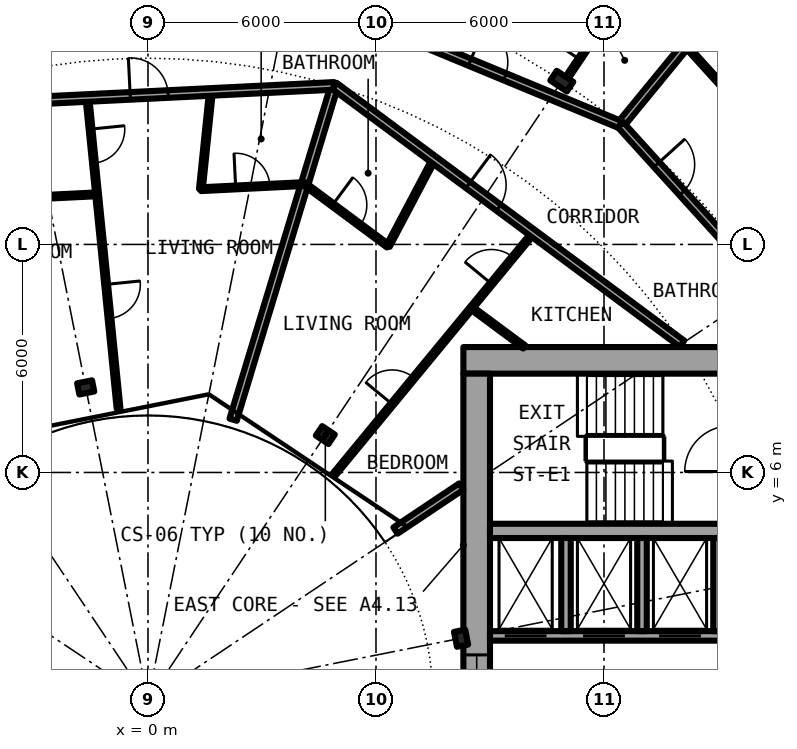
"""IFC4 building model, lengths in metres.
Left out: names, types, materials, properties, quantities, classifications, styles, units other than length and angle.
Written with IfcOpenShell. Run it as: python <this file> out.ifc"""

import sys

from ifc_helpers import new_model, si_unit, direction, frame, frame_2d, origin, origin_2d, place, context, subcontext, project, spatial, rectangle, i_section, extrude, element, fill, save


model = new_model("IFC4")
c1 = context("Model", 3, precision=1e-05, world=origin(), true_north=direction((0.0, 1.0)))
c2 = subcontext(c1, "Body", "Model", "MODEL_VIEW")
j1 = project(units=[si_unit("LENGTHUNIT", "METRE"), si_unit("PLANEANGLEUNIT", "RADIAN")], contexts=[c1])
p1 = place(None, origin())
s1 = spatial("IfcSite", under=j1, at=p1, CompositionType="ELEMENT")
p2 = place(p1, origin())
s2 = spatial("IfcBuilding", under=s1, at=p2, CompositionType="ELEMENT")
p3 = place(p2, frame((0.0, 0.0, 72.75)))
s3 = spatial("IfcBuildingStorey", under=s2, at=p3, CompositionType="ELEMENT", Elevation=72.75)
p4 = place(p3, frame((10.889, 16.297, 0.0), z_axis=(0.0, 0.0, 1.0), x_axis=(0.55557023302, 0.831469612303, 0.0)))
e1 = element("IfcColumn", 1, at=p4, inside=s3, PredefinedType="COLUMN", context=c2, shape_type="SweptSolid", body=[
    extrude(i_section(OverallWidth=0.306, OverallDepth=0.524, WebThickness=0.021, FlangeThickness=0.04, FilletRadius=0.027, at=origin_2d()), origin(), (0.0, 0.0, 1.0), 3.05),
])
for number, where, z_axis, x_axis in (
    (2, (8.239, 1.639, 0.0), (0.0, 0.0, 1.0), (0.981, 0.195, 0.0)),
    (3, (4.667, 6.984, 0.0), (0.0, 0.0, 1.0), (0.556, 0.831, 0.0)),
    (4, (-1.639, 8.239, 0.0), (0.0, 0.0, 1.0), (-0.195, 0.981, 0.0)),
):
    element("IfcColumn", number, at=place(p3, frame(where, z_axis=z_axis, x_axis=x_axis)), inside=s3, PredefinedType="COLUMN", context=c2, shape_type="SweptSolid", body=[
        extrude(i_section(OverallWidth=0.3, OverallDepth=0.4, WebThickness=0.013, FlangeThickness=0.024, FilletRadius=0.027, at=origin_2d()), origin(), (0.0, 0.0, 1.0), 3.05),
    ])
p5 = place(p3, frame((22.3, 8.95, 0.0), z_axis=(0.0, 0.0, 1.0), x_axis=(-1.0, 0.0, 0.0)))
e5 = element("IfcWall", 5, at=p5, inside=s3, PredefinedType="SHEAR", context=c2, shape_type="SweptSolid", body=[
    extrude(rectangle(XDim=14.0, YDim=0.7, at=frame_2d((7.0, 0.0))), origin(), (0.0, 0.0, 1.0), 3.05),
])
p6 = place(p5, frame((1.225, 0.0, 0.0)))
e6 = element("IfcOpeningElement", 6, at=p6, cuts=e5, PredefinedType="OPENING", context=c2, shape_type="SweptSolid", body=[
    extrude(rectangle(XDim=1.2, YDim=2.3, at=frame_2d((0.6, 1.15))), frame((0.0, 0.36, 0.0), z_axis=(0.0, -1.0, 0.0), x_axis=(1.0, 0.0, 0.0)), (0.0, 0.0, 1.0), 0.72),
])
p7 = place(p3, frame((8.65, -8.6, 0.0), z_axis=(0.0, 0.0, 1.0), x_axis=(0.0, 1.0, 0.0)))
e7 = element("IfcWall", 7, at=p7, inside=s3, PredefinedType="SHEAR", context=c2, shape_type="SweptSolid", body=[
    extrude(rectangle(XDim=17.2, YDim=0.7, at=frame_2d((8.6, 0.0))), origin(), (0.0, 0.0, 1.0), 3.05),
])
p8 = place(p7, frame((7.4, 0.0, 0.1)))
e8 = element("IfcOpeningElement", 8, at=p8, cuts=e7, PredefinedType="OPENING", context=c2, shape_type="SweptSolid", body=[
    extrude(rectangle(XDim=2.4, YDim=2.2, at=frame_2d((1.2, 1.1))), frame((0.0, 0.36, 0.0), z_axis=(0.0, -1.0, 0.0), x_axis=(1.0, 0.0, 0.0)), (0.0, 0.0, 1.0), 0.72),
])
p9 = place(p3, frame((9.0, 1.7, 0.0), z_axis=(0.0, 0.0, 1.0), x_axis=(1.0, 0.0, 0.0)))
e9 = element("IfcWall", 9, at=p9, inside=s3, PredefinedType="SHEAR", context=c2, shape_type="SweptSolid", body=[
    extrude(rectangle(XDim=10.15, YDim=0.25, at=frame_2d((5.075, 0.0))), origin(), (0.0, 0.0, 1.0), 3.05),
])
p10 = place(p9, frame((0.387, 0.0, 0.0)))
e10 = element("IfcOpeningElement", 10, at=p10, cuts=e9, PredefinedType="OPENING", context=c2, shape_type="SweptSolid", body=[
    extrude(rectangle(XDim=1.1, YDim=2.3, at=frame_2d((0.55, 1.15))), frame((0.0, 0.135, 0.0), z_axis=(0.0, -1.0, 0.0), x_axis=(1.0, 0.0, 0.0)), (0.0, 0.0, 1.0), 0.27),
])
p11 = place(p9, frame((2.45, 0.0, 0.0)))
e11 = element("IfcOpeningElement", 11, at=p11, cuts=e9, PredefinedType="OPENING", context=c2, shape_type="SweptSolid", body=[
    extrude(rectangle(XDim=1.1, YDim=2.3, at=frame_2d((0.55, 1.15))), frame((0.0, 0.135, 0.0), z_axis=(0.0, -1.0, 0.0), x_axis=(1.0, 0.0, 0.0)), (0.0, 0.0, 1.0), 0.27),
])
p12 = place(p9, frame((4.45, 0.0, 0.0)))
e12 = element("IfcOpeningElement", 12, at=p12, cuts=e9, PredefinedType="OPENING", context=c2, shape_type="SweptSolid", body=[
    extrude(rectangle(XDim=1.1, YDim=2.3, at=frame_2d((0.55, 1.15))), frame((0.0, 0.135, 0.0), z_axis=(0.0, -1.0, 0.0), x_axis=(1.0, 0.0, 0.0)), (0.0, 0.0, 1.0), 0.27),
])
p13 = place(p3, frame((9.0, 4.462, 0.0), z_axis=(0.0, 0.0, 1.0), x_axis=(1.0, 0.0, 0.0)))
e13 = element("IfcWall", 13, at=p13, inside=s3, PredefinedType="SHEAR", context=c2, shape_type="SweptSolid", body=[
    extrude(rectangle(XDim=10.15, YDim=0.375, at=frame_2d((5.075, 0.0))), origin(), (0.0, 0.0, 1.0), 3.05),
])
p14 = place(p13, frame((6.6, 0.0, 0.0)))
e14 = element("IfcOpeningElement", 14, at=p14, cuts=e13, PredefinedType="OPENING", context=c2, shape_type="SweptSolid", body=[
    extrude(rectangle(XDim=1.1, YDim=2.3, at=frame_2d((0.55, 1.15))), frame((0.0, 0.198, 0.0), z_axis=(0.0, -1.0, 0.0), x_axis=(1.0, 0.0, 0.0)), (0.0, 0.0, 1.0), 0.395),
])
for number, where, z_axis, x_axis in (
    (15, (15.0, 1.825, 0.0), (0.0, 0.0, 1.0), (0.0, 1.0, 0.0)),
    (16, (11.0, 1.825, 0.0), (0.0, 0.0, 1.0), (0.0, 1.0, 0.0)),
    (17, (13.0, 1.825, 0.0), (0.0, 0.0, 1.0), (0.0, 1.0, 0.0)),
):
    element("IfcWall", number, at=place(p3, frame(where, z_axis=z_axis, x_axis=x_axis)), inside=s3, PredefinedType="SOLIDWALL", context=c2, shape_type="SweptSolid", body=[
        extrude(rectangle(XDim=2.45, YDim=0.25, at=frame_2d((1.225, 0.0))), origin(), (0.0, 0.0, 1.0), 2.7),
    ])
p15 = place(p3, frame((-1.593, 15.853, 0.0), z_axis=(0.0, 0.0, 1.0), x_axis=(0.099730339513, -0.995014502096, 0.0)))
e18 = element("IfcWall", 18, at=p15, inside=s3, PredefinedType="PARTITIONING", context=c2, shape_type="SweptSolid", body=[
    extrude(rectangle(XDim=8.213, YDim=0.1, at=frame_2d((4.106, 0.0))), origin(), (0.0, 0.0, 1.0), 2.7),
])
p16 = place(p15, frame((0.823, 0.0, 0.0)))
e19 = element("IfcOpeningElement", 19, at=p16, cuts=e18, PredefinedType="OPENING", context=c2, shape_type="SweptSolid", body=[
    extrude(rectangle(XDim=0.9, YDim=2.3, at=frame_2d((0.45, 1.15))), frame((0.0, 0.06, 0.0), z_axis=(0.0, -1.0, 0.0), x_axis=(1.0, 0.0, 0.0)), (0.0, 0.0, 1.0), 0.12),
])
p17 = place(p15, frame((4.929, 0.0, 0.0)))
e20 = element("IfcOpeningElement", 20, at=p17, cuts=e18, PredefinedType="OPENING", context=c2, shape_type="SweptSolid", body=[
    extrude(rectangle(XDim=0.9, YDim=2.3, at=frame_2d((0.45, 1.15))), frame((0.0, 0.06, 0.0), z_axis=(0.0, -1.0, 0.0), x_axis=(1.0, 0.0, 0.0)), (0.0, 0.0, 1.0), 0.12),
])
p18 = place(p3, frame((1.392, 13.454, 0.0), z_axis=(0.0, 0.0, 1.0), x_axis=(0.102594773028, 0.994723234145, 0.0)))
e21 = element("IfcWall", 21, at=p18, inside=s3, PredefinedType="PARTITIONING", context=c2, shape_type="SweptSolid", body=[
    extrude(rectangle(XDim=2.573, YDim=0.1, at=frame_2d((1.286, 0.0))), origin(), (0.0, 0.0, 1.0), 2.7),
])
p19 = place(p3, frame((2.241, 7.388, 0.0), z_axis=(0.0, 0.0, 1.0), x_axis=(0.290323311932, 0.956928615179, 0.0)))
e22 = element("IfcWall", 22, at=p19, inside=s3, PredefinedType="PARTITIONING", context=c2, shape_type="SweptSolid", body=[
    extrude(rectangle(XDim=9.179, YDim=0.2, at=frame_2d((4.59, 0.0))), origin(), (0.0, 0.0, 1.0), 2.7),
])
p20 = place(p3, frame((4.909, 5.958, 0.0), z_axis=(0.0, 0.0, 1.0), x_axis=(0.635976043025, 0.771708800454, 0.0)))
e23 = element("IfcWall", 23, at=p20, inside=s3, PredefinedType="PARTITIONING", context=c2, shape_type="SweptSolid", body=[
    extrude(rectangle(XDim=8.213, YDim=0.1, at=frame_2d((4.106, 0.0))), origin(), (0.0, 0.0, 1.0), 2.7),
])
p21 = place(p20, frame((6.49, 0.0, 0.0)))
e24 = element("IfcOpeningElement", 24, at=p21, cuts=e23, PredefinedType="OPENING", context=c2, shape_type="SweptSolid", body=[
    extrude(rectangle(XDim=0.9, YDim=2.3, at=frame_2d((0.45, 1.15))), frame((0.0, 0.06, 0.0), z_axis=(0.0, -1.0, 0.0), x_axis=(1.0, 0.0, 0.0)), (0.0, 0.0, 1.0), 0.12),
])
p22 = place(p20, frame((2.384, 0.0, 0.0)))
e25 = element("IfcOpeningElement", 25, at=p22, cuts=e23, PredefinedType="OPENING", context=c2, shape_type="SweptSolid", body=[
    extrude(rectangle(XDim=0.9, YDim=2.3, at=frame_2d((0.45, 1.15))), frame((0.0, 0.06, 0.0), z_axis=(0.0, -1.0, 0.0), x_axis=(1.0, 0.0, 0.0)), (0.0, 0.0, 1.0), 0.12),
])
p23 = place(p3, frame((6.318, 11.96, 0.0), z_axis=(0.0, 0.0, 1.0), x_axis=(0.467001992543, 0.884256263173, 0.0)))
e26 = element("IfcWall", 26, at=p23, inside=s3, PredefinedType="PARTITIONING", context=c2, shape_type="SweptSolid", body=[
    extrude(rectangle(XDim=2.572, YDim=0.1, at=frame_2d((1.286, 0.0))), origin(), (0.0, 0.0, 1.0), 2.7),
])
p24 = place(p3, frame((11.087, 16.48, 0.0), z_axis=(0.0, 0.0, 1.0), x_axis=(0.558383137663, 0.829583191472, 0.0)))
e27 = element("IfcWall", 27, at=p24, inside=s3, PredefinedType="PARTITIONING", context=c2, shape_type="SweptSolid", body=[
    extrude(rectangle(XDim=1.909, YDim=0.1, at=frame_2d((0.955, 0.0))), origin(), (0.0, 0.0, 1.0), 2.7),
])
p25 = place(p24, frame((0.474, 0.0, 0.0)))
e28 = element("IfcOpeningElement", 28, at=p25, cuts=e27, PredefinedType="OPENING", context=c2, shape_type="SweptSolid", body=[
    extrude(rectangle(XDim=0.9, YDim=2.3, at=frame_2d((0.45, 1.15))), frame((0.0, 0.06, 0.0), z_axis=(0.0, -1.0, 0.0), x_axis=(1.0, 0.0, 0.0)), (0.0, 0.0, 1.0), 0.12),
])
p26 = place(p3, frame((12.435, 15.15, 0.0), z_axis=(0.0, 0.0, 1.0), x_axis=(0.634458323308, 0.772957072537, 0.0)))
e29 = element("IfcWall", 29, at=p26, inside=s3, PredefinedType="PARTITIONING", context=c2, shape_type="SweptSolid", body=[
    extrude(rectangle(XDim=7.576, YDim=0.2, at=frame_2d((3.788, 0.0))), origin(), (0.0, 0.0, 1.0), 2.7),
])
p27 = place(p3, frame((6.513, 4.472, 0.0), z_axis=(0.0, 0.0, 1.0), x_axis=(0.831382204863, 0.555701025225, 0.0)))
e30 = element("IfcWall", 30, at=p27, inside=s3, PredefinedType="PARTITIONING", context=c2, shape_type="SweptSolid", body=[
    extrude(rectangle(XDim=2.082, YDim=0.2, at=frame_2d((1.041, 0.0))), origin(), (0.0, 0.0, 1.0), 2.7),
])
p28 = place(p3, frame((-5.439, 13.116, 0.0), z_axis=(0.0, 0.0, 1.0), x_axis=(0.998772010578, 0.049542616872, 0.0)))
e31 = element("IfcWall", 31, at=p28, inside=s3, PredefinedType="PARTITIONING", context=c2, shape_type="SweptSolid", body=[
    extrude(rectangle(XDim=4.1, YDim=0.1, at=frame_2d((2.05, 0.0))), origin(), (0.0, 0.0, 1.0), 2.7),
])
p29 = place(p3, frame((1.392, 13.454, 0.0), z_axis=(0.0, 0.0, 1.0), x_axis=(0.998779365748, 0.049394114582, 0.0)))
e32 = element("IfcWall", 32, at=p29, inside=s3, PredefinedType="PARTITIONING", context=c2, shape_type="SweptSolid", body=[
    extrude(rectangle(XDim=2.733, YDim=0.1, at=frame_2d((1.367, 0.0))), origin(), (0.0, 0.0, 1.0), 2.7),
])
p30 = place(p29, frame((0.917, 0.0, 0.0)))
e33 = element("IfcOpeningElement", 33, at=p30, cuts=e32, PredefinedType="OPENING", context=c2, shape_type="SweptSolid", body=[
    extrude(rectangle(XDim=0.9, YDim=2.3, at=frame_2d((0.45, 1.15))), frame((0.0, 0.06, 0.0), z_axis=(0.0, -1.0, 0.0), x_axis=(1.0, 0.0, 0.0)), (0.0, 0.0, 1.0), 0.12),
])
p31 = place(p3, frame((4.122, 13.589, 0.0), z_axis=(0.0, 0.0, 1.0), x_axis=(0.803128348509, -0.595806055542, 0.0)))
e34 = element("IfcWall", 34, at=p31, inside=s3, PredefinedType="PARTITIONING", context=c2, shape_type="SweptSolid", body=[
    extrude(rectangle(XDim=2.734, YDim=0.1, at=frame_2d((1.367, 0.0))), origin(), (0.0, 0.0, 1.0), 2.7),
])
p32 = place(p31, frame((0.917, 0.0, 0.0)))
e35 = element("IfcOpeningElement", 35, at=p32, cuts=e34, PredefinedType="OPENING", context=c2, shape_type="SweptSolid", body=[
    extrude(rectangle(XDim=0.9, YDim=2.3, at=frame_2d((0.45, 1.15))), frame((0.0, 0.06, 0.0), z_axis=(0.0, -1.0, 0.0), x_axis=(1.0, 0.0, 0.0)), (0.0, 0.0, 1.0), 0.12),
])
p33 = place(p3, frame((8.512, 10.332, 0.0), z_axis=(0.0, 0.0, 1.0), x_axis=(0.803135014325, -0.595797070121, 0.0)))
e36 = element("IfcWall", 36, at=p33, inside=s3, PredefinedType="PARTITIONING", context=c2, shape_type="SweptSolid", body=[
    extrude(rectangle(XDim=1.732, YDim=0.1, at=frame_2d((0.866, 0.0))), origin(), (0.0, 0.0, 1.0), 2.7),
])
p34 = place(p3, frame((-6.468, 15.614, 0.0), z_axis=(0.0, 0.0, 1.0), x_axis=(0.998797695979, 0.049022061427, 0.0)))
e37 = element("IfcWall", 37, at=p34, inside=s3, PredefinedType="PARTITIONING", context=c2, shape_type="SweptSolid", body=[
    extrude(rectangle(XDim=11.385, YDim=0.2, at=frame_2d((5.692, 0.0))), origin(), (0.0, 0.0, 1.0), 2.7),
])
p35 = place(p34, frame((6.008, 0.0, 0.0)))
e38 = element("IfcOpeningElement", 38, at=p35, cuts=e37, PredefinedType="OPENING", context=c2, shape_type="SweptSolid", body=[
    extrude(rectangle(XDim=1.0, YDim=2.3, at=frame_2d((0.5, 1.15))), frame((0.0, 0.11, 0.0), z_axis=(0.0, -1.0, 0.0), x_axis=(1.0, 0.0, 0.0)), (0.0, 0.0, 1.0), 0.22),
])
p36 = place(p3, frame((4.906, 16.172, 0.0), z_axis=(0.0, 0.0, 1.0), x_axis=(0.803204584823, -0.59570327758, 0.0)))
e39 = element("IfcWall", 39, at=p36, inside=s3, PredefinedType="PARTITIONING", context=c2, shape_type="SweptSolid", body=[
    extrude(rectangle(XDim=11.387, YDim=0.2, at=frame_2d((5.693, 0.0))), origin(), (0.0, 0.0, 1.0), 2.7),
])
p37 = place(p36, frame((4.38, 0.0, 0.0)))
e40 = element("IfcOpeningElement", 40, at=p37, cuts=e39, PredefinedType="OPENING", context=c2, shape_type="SweptSolid", body=[
    extrude(rectangle(XDim=1.0, YDim=2.3, at=frame_2d((0.5, 1.15))), frame((0.0, 0.11, 0.0), z_axis=(0.0, -1.0, 0.0), x_axis=(1.0, 0.0, 0.0)), (0.0, 0.0, 1.0), 0.22),
])
p38 = place(p3, frame((1.921, 19.506, 0.0), z_axis=(0.0, 0.0, 1.0), x_axis=(0.923845560554, -0.38276543763, 0.0)))
e41 = element("IfcWall", 41, at=p38, inside=s3, PredefinedType="PARTITIONING", context=c2, shape_type="SweptSolid", body=[
    extrude(rectangle(XDim=11.381, YDim=0.2, at=frame_2d((5.69, 0.0))), origin(), (0.0, 0.0, 1.0), 2.7),
])
p39 = place(p38, frame((7.087, 0.0, 0.0)))
e42 = element("IfcOpeningElement", 42, at=p39, cuts=e41, PredefinedType="OPENING", context=c2, shape_type="SweptSolid", body=[
    extrude(rectangle(XDim=1.0, YDim=2.3, at=frame_2d((0.5, 1.15))), frame((0.0, 0.11, 0.0), z_axis=(0.0, -1.0, 0.0), x_axis=(1.0, 0.0, 0.0)), (0.0, 0.0, 1.0), 0.22),
])
p40 = place(p3, frame((12.434, 15.151, 0.0), z_axis=(0.0, 0.0, 1.0), x_axis=(0.671601747072, -0.740912338492, 0.0)))
e43 = element("IfcWall", 43, at=p40, inside=s3, PredefinedType="PARTITIONING", context=c2, shape_type="SweptSolid", body=[
    extrude(rectangle(XDim=5.597, YDim=0.2, at=frame_2d((2.799, 0.0))), origin(), (0.0, 0.0, 1.0), 2.38),
])
p41 = place(p40, frame((1.417, 0.0, 0.0)))
e44 = element("IfcOpeningElement", 44, at=p41, cuts=e43, PredefinedType="OPENING", context=c2, shape_type="SweptSolid", body=[
    extrude(rectangle(XDim=1.0, YDim=2.3, at=frame_2d((0.5, 1.15))), frame((0.0, 0.11, 0.0), z_axis=(0.0, -1.0, 0.0), x_axis=(1.0, 0.0, 0.0)), (0.0, 0.0, 1.0), 0.22),
])
p42 = place(p3, frame((14.147, 17.238, 0.0), z_axis=(0.0, 0.0, 1.0), x_axis=(0.671674967707, -0.740845960882, 0.0)))
e45 = element("IfcWall", 45, at=p42, inside=s3, PredefinedType="PARTITIONING", context=c2, shape_type="SweptSolid", body=[
    extrude(rectangle(XDim=2.181, YDim=0.1, at=frame_2d((1.091, 0.0))), origin(), (0.0, 0.0, 1.0), 2.7),
])
p43 = place(p10, origin())
e46 = element("IfcDoor", 46, at=p43, inside=s3, OperationType="DOUBLE_DOOR_SLIDING", PredefinedType="DOOR", context=c2, shape_type="SweptSolid", body=[
    extrude(rectangle(XDim=1.1, YDim=2.3, at=frame_2d((0.55, 1.15))), frame((0.0, 0.025, 0.0), z_axis=(0.0, -1.0, 0.0), x_axis=(1.0, 0.0, 0.0)), (0.0, 0.0, 1.0), 0.05),
])
fill(e10, e46)
p44 = place(p11, origin())
e47 = element("IfcDoor", 47, at=p44, inside=s3, OperationType="DOUBLE_DOOR_SLIDING", PredefinedType="DOOR", context=c2, shape_type="SweptSolid", body=[
    extrude(rectangle(XDim=1.1, YDim=2.3, at=frame_2d((0.55, 1.15))), frame((0.0, 0.025, 0.0), z_axis=(0.0, -1.0, 0.0), x_axis=(1.0, 0.0, 0.0)), (0.0, 0.0, 1.0), 0.05),
])
fill(e11, e47)
p45 = place(p12, origin())
e48 = element("IfcDoor", 48, at=p45, inside=s3, OperationType="DOUBLE_DOOR_SLIDING", PredefinedType="DOOR", context=c2, shape_type="SweptSolid", body=[
    extrude(rectangle(XDim=1.1, YDim=2.3, at=frame_2d((0.55, 1.15))), frame((0.0, 0.025, 0.0), z_axis=(0.0, -1.0, 0.0), x_axis=(1.0, 0.0, 0.0)), (0.0, 0.0, 1.0), 0.05),
])
fill(e12, e48)
p46 = place(p8, origin())
e49 = element("IfcWindow", 49, at=p46, inside=s3, PartitioningType="SINGLE_PANEL", PredefinedType="WINDOW", context=c2, shape_type="SweptSolid", body=[
    extrude(rectangle(XDim=2.4, YDim=2.2, at=frame_2d((1.2, 1.1))), frame((0.0, 0.03, 0.0), z_axis=(0.0, -1.0, 0.0), x_axis=(1.0, 0.0, 0.0)), (0.0, 0.0, 1.0), 0.06),
])
fill(e8, e49)
p47 = place(p41, origin())
e50 = element("IfcDoor", 50, at=p47, inside=s3, OperationType="SINGLE_SWING_LEFT", PredefinedType="DOOR", context=c2, shape_type="SweptSolid", body=[
    extrude(rectangle(XDim=1.0, YDim=2.3, at=frame_2d((0.5, 1.15))), frame((0.0, 0.025, 0.0), z_axis=(0.0, -1.0, 0.0), x_axis=(1.0, 0.0, 0.0)), (0.0, 0.0, 1.0), 0.05),
])
fill(e44, e50)
p48 = place(p39, origin())
e51 = element("IfcDoor", 51, at=p48, inside=s3, OperationType="SINGLE_SWING_RIGHT", PredefinedType="DOOR", context=c2, shape_type="SweptSolid", body=[
    extrude(rectangle(XDim=1.0, YDim=2.3, at=frame_2d((0.5, 1.15))), frame((0.0, 0.025, 0.0), z_axis=(0.0, -1.0, 0.0), x_axis=(1.0, 0.0, 0.0)), (0.0, 0.0, 1.0), 0.05),
])
fill(e42, e51)
p49 = place(p25, origin())
e52 = element("IfcDoor", 52, at=p49, inside=s3, OperationType="SINGLE_SWING_LEFT", PredefinedType="DOOR", context=c2, shape_type="SweptSolid", body=[
    extrude(rectangle(XDim=0.9, YDim=2.3, at=frame_2d((0.45, 1.15))), frame((0.0, 0.025, 0.0), z_axis=(0.0, -1.0, 0.0), x_axis=(1.0, 0.0, 0.0)), (0.0, 0.0, 1.0), 0.05),
])
fill(e28, e52)
p50 = place(p37, origin())
e53 = element("IfcDoor", 53, at=p50, inside=s3, OperationType="SINGLE_SWING_LEFT", PredefinedType="DOOR", context=c2, shape_type="SweptSolid", body=[
    extrude(rectangle(XDim=1.0, YDim=2.3, at=frame_2d((0.5, 1.15))), frame((0.0, 0.025, 0.0), z_axis=(0.0, -1.0, 0.0), x_axis=(1.0, 0.0, 0.0)), (0.0, 0.0, 1.0), 0.05),
])
fill(e40, e53)
p51 = place(p32, origin())
e54 = element("IfcDoor", 54, at=p51, inside=s3, OperationType="SINGLE_SWING_LEFT", PredefinedType="DOOR", context=c2, shape_type="SweptSolid", body=[
    extrude(rectangle(XDim=0.9, YDim=2.3, at=frame_2d((0.45, 1.15))), frame((0.0, 0.025, 0.0), z_axis=(0.0, -1.0, 0.0), x_axis=(1.0, 0.0, 0.0)), (0.0, 0.0, 1.0), 0.05),
])
fill(e35, e54)
p52 = place(p21, origin())
e55 = element("IfcDoor", 55, at=p52, inside=s3, OperationType="SINGLE_SWING_RIGHT", PredefinedType="DOOR", context=c2, shape_type="SweptSolid", body=[
    extrude(rectangle(XDim=0.9, YDim=2.3, at=frame_2d((0.45, 1.15))), frame((0.0, 0.025, 0.0), z_axis=(0.0, -1.0, 0.0), x_axis=(1.0, 0.0, 0.0)), (0.0, 0.0, 1.0), 0.05),
])
fill(e24, e55)
p53 = place(p22, origin())
e56 = element("IfcDoor", 56, at=p53, inside=s3, OperationType="SINGLE_SWING_LEFT", PredefinedType="DOOR", context=c2, shape_type="SweptSolid", body=[
    extrude(rectangle(XDim=0.9, YDim=2.3, at=frame_2d((0.45, 1.15))), frame((0.0, 0.025, 0.0), z_axis=(0.0, -1.0, 0.0), x_axis=(1.0, 0.0, 0.0)), (0.0, 0.0, 1.0), 0.05),
])
fill(e25, e56)
p54 = place(p35, origin())
e57 = element("IfcDoor", 57, at=p54, inside=s3, OperationType="SINGLE_SWING_RIGHT", PredefinedType="DOOR", context=c2, shape_type="SweptSolid", body=[
    extrude(rectangle(XDim=1.0, YDim=2.3, at=frame_2d((0.5, 1.15))), frame((0.0, 0.025, 0.0), z_axis=(0.0, -1.0, 0.0), x_axis=(1.0, 0.0, 0.0)), (0.0, 0.0, 1.0), 0.05),
])
fill(e38, e57)
p55 = place(p30, origin())
e58 = element("IfcDoor", 58, at=p55, inside=s3, OperationType="SINGLE_SWING_RIGHT", PredefinedType="DOOR", context=c2, shape_type="SweptSolid", body=[
    extrude(rectangle(XDim=0.9, YDim=2.3, at=frame_2d((0.45, 1.15))), frame((0.0, 0.025, 0.0), z_axis=(0.0, -1.0, 0.0), x_axis=(1.0, 0.0, 0.0)), (0.0, 0.0, 1.0), 0.05),
])
fill(e33, e58)
p56 = place(p16, origin())
e59 = element("IfcDoor", 59, at=p56, inside=s3, OperationType="SINGLE_SWING_LEFT", PredefinedType="DOOR", context=c2, shape_type="SweptSolid", body=[
    extrude(rectangle(XDim=0.9, YDim=2.3, at=frame_2d((0.45, 1.15))), frame((0.0, 0.025, 0.0), z_axis=(0.0, -1.0, 0.0), x_axis=(1.0, 0.0, 0.0)), (0.0, 0.0, 1.0), 0.05),
])
fill(e19, e59)
p57 = place(p17, origin())
e60 = element("IfcDoor", 60, at=p57, inside=s3, OperationType="SINGLE_SWING_RIGHT", PredefinedType="DOOR", context=c2, shape_type="SweptSolid", body=[
    extrude(rectangle(XDim=0.9, YDim=2.3, at=frame_2d((0.45, 1.15))), frame((0.0, 0.025, 0.0), z_axis=(0.0, -1.0, 0.0), x_axis=(1.0, 0.0, 0.0)), (0.0, 0.0, 1.0), 0.05),
])
fill(e20, e60)
save(model, sys.argv[1])
